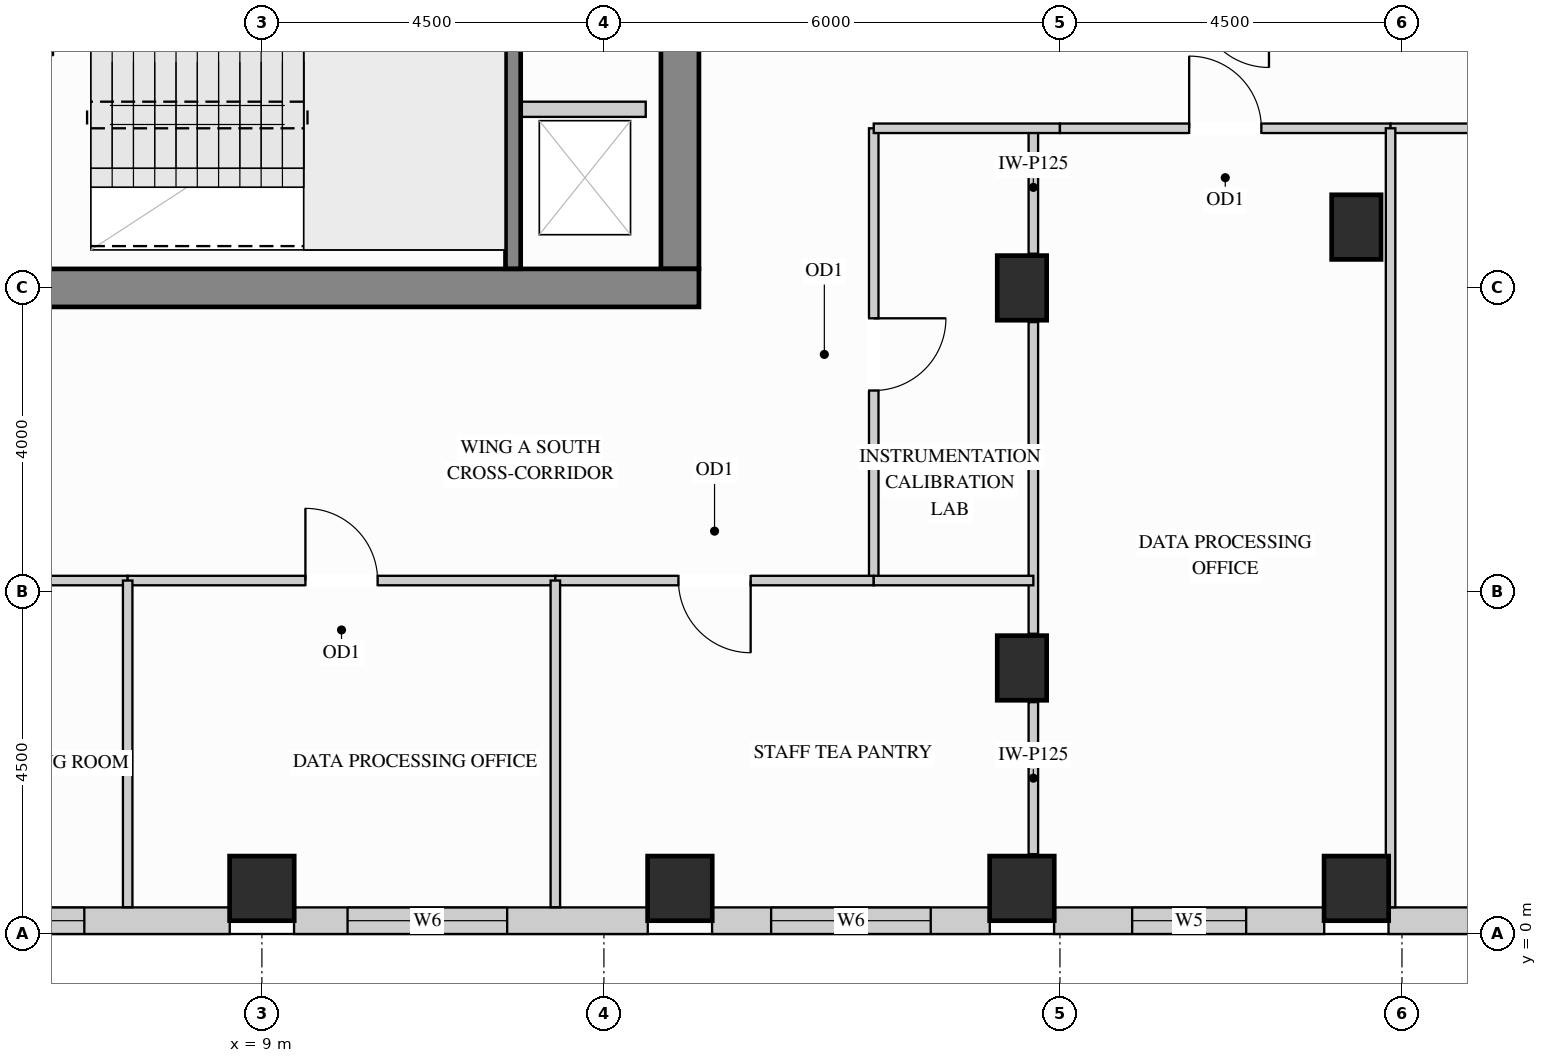
"""IFC4 building model, lengths in metres.
Left out: names, types, materials, properties, quantities, classifications, styles, units other than length and angle.
Written with IfcOpenShell. Run it as: python <this file> out.ifc"""

import sys

from ifc_helpers import new_model, si_unit, direction, frame, frame_2d, origin, origin_2d, place, context, subcontext, project, spatial, rectangle, extrude, source, transform, mapped, element, fill, save


model = new_model("IFC4")
c1 = context("Model", 3, precision=1e-05, world=origin(), true_north=direction((0.0, 1.0)))
c2 = subcontext(c1, "Body", "Model", "MODEL_VIEW")
j1 = project(units=[si_unit("LENGTHUNIT", "METRE"), si_unit("PLANEANGLEUNIT", "RADIAN")], contexts=[c1])
p1 = place(None, origin())
s1 = spatial("IfcSite", under=j1, at=p1, CompositionType="ELEMENT")
p2 = place(p1, origin())
s2 = spatial("IfcBuilding", under=s1, at=p2, CompositionType="ELEMENT")
p3 = place(p2, frame((0.0, 0.0, 252.0)))
s3 = spatial("IfcBuildingStorey", under=s2, at=p3, CompositionType="ELEMENT", Elevation=252.0)
m1 = source(origin(), c2, "Body", "SweptSolid", [
    extrude(rectangle(XDim=0.65, YDim=0.85, at=origin_2d()), origin(), (0.0, 0.0, 1.0), 3.4),
])
for number, where, z_axis, x_axis in (
    (1, (19.0, 3.5, 0.0), (0.0, 0.0, 1.0), (1.0, 0.0, 0.0)),
    (2, (19.0, 8.5, 0.0), (0.0, 0.0, 1.0), (1.0, 0.0, 0.0)),
    (3, (23.4, 9.3, 0.0), (0.0, 0.0, 1.0), (1.0, 0.0, 0.0)),
):
    element("IfcColumn", number, at=place(p3, frame(where, z_axis=z_axis, x_axis=x_axis)), inside=s3, PredefinedType="COLUMN", context=c2, shape_type="MappedRepresentation", body=[
        mapped(m1, transform((0.0, 0.0, 0.0), x_axis=(1.0, 0.0, 0.0), y_axis=(0.0, 1.0, 0.0), z_axis=(0.0, 0.0, 1.0))),
    ])
m2 = source(origin(), c2, "Body", "SweptSolid", [
    extrude(rectangle(XDim=0.85, YDim=0.85, at=origin_2d()), origin(), (0.0, 0.0, 1.0), 3.4),
])
for number, where, z_axis, x_axis in (
    (4, (14.5, 0.6, 0.0), (0.0, 0.0, 1.0), (1.0, 0.0, 0.0)),
    (5, (19.0, 0.6, 0.0), (0.0, 0.0, 1.0), (1.0, 0.0, 0.0)),
    (6, (23.4, 0.6, 0.0), (0.0, 0.0, 1.0), (1.0, 0.0, 0.0)),
    (7, (9.0, 0.6, 0.0), (0.0, 0.0, 1.0), (1.0, 0.0, 0.0)),
):
    element("IfcColumn", number, at=place(p3, frame(where, z_axis=z_axis, x_axis=x_axis)), inside=s3, PredefinedType="COLUMN", context=c2, shape_type="MappedRepresentation", body=[
        mapped(m2, transform((0.0, 0.0, 0.0), x_axis=(1.0, 0.0, 0.0), y_axis=(0.0, 1.0, 0.0), z_axis=(0.0, 0.0, 1.0))),
    ])
m3 = source(origin(), c2, "Body", "SweptSolid", [
    extrude(rectangle(XDim=10.07, YDim=0.5, at=frame_2d((5.035, 0.0))), origin(), (0.0, 0.0, 1.0), 3.4),
])
p4 = place(p3, frame((14.5, 8.75, 0.0), z_axis=(0.0, 0.0, 1.0), x_axis=(0.0, 1.0, 0.0)))
e8 = element("IfcWall", 8, at=p4, inside=s3, PredefinedType="SHEAR", context=c2, shape_type="MappedRepresentation", body=[
    mapped(m3, transform((0.0, 0.0, 0.0), x_axis=(1.0, 0.0, 0.0), y_axis=(0.0, 1.0, 0.0), z_axis=(0.0, 0.0, 1.0))),
])
m4 = source(origin(), c2, "Body", "SweptSolid", [
    extrude(rectangle(XDim=10.5, YDim=0.5, at=frame_2d((5.25, 0.0))), origin(), (0.0, 0.0, 1.0), 3.4),
])
p5 = place(p3, frame((4.25, 8.5, 0.0), z_axis=(0.0, 0.0, 1.0), x_axis=(1.0, 0.0, 0.0)))
e9 = element("IfcWall", 9, at=p5, inside=s3, PredefinedType="SHEAR", context=c2, shape_type="MappedRepresentation", body=[
    mapped(m4, transform((0.0, 0.0, 0.0), x_axis=(1.0, 0.0, 0.0), y_axis=(0.0, 1.0, 0.0), z_axis=(0.0, 0.0, 1.0))),
])
p6 = place(p3, frame((3.923, 0.175, 0.0), z_axis=(0.0, 0.0, 1.0), x_axis=(1.0, 0.0, 0.0)))
e10 = element("IfcWall", 10, at=p6, inside=s3, PredefinedType="SOLIDWALL", context=c2, shape_type="SweptSolid", body=[
    extrude(rectangle(XDim=4.654, YDim=0.35, at=frame_2d((2.327, 0.0))), origin(), (0.0, 0.0, 1.0), 3.385),
])
p7 = place(p6, frame((0.64, 0.0, 0.78)))
e11 = element("IfcOpeningElement", 11, at=p7, cuts=e10, PredefinedType="OPENING", context=c2, shape_type="SweptSolid", body=[
    extrude(rectangle(XDim=2.1, YDim=2.25, at=frame_2d((1.05, 1.125))), frame((0.0, 0.185, 0.0), z_axis=(0.0, -1.0, 0.0), x_axis=(1.0, 0.0, 0.0)), (0.0, 0.0, 1.0), 0.37),
])
p8 = place(p3, frame((9.423, 0.175, 0.0), z_axis=(0.0, 0.0, 1.0), x_axis=(1.0, 0.0, 0.0)))
e12 = element("IfcWall", 12, at=p8, inside=s3, PredefinedType="SOLIDWALL", context=c2, shape_type="SweptSolid", body=[
    extrude(rectangle(XDim=4.654, YDim=0.35, at=frame_2d((2.327, 0.0))), origin(), (0.0, 0.0, 1.0), 3.385),
])
p9 = place(p8, frame((0.704, 0.0, 0.78)))
e13 = element("IfcOpeningElement", 13, at=p9, cuts=e12, PredefinedType="OPENING", context=c2, shape_type="SweptSolid", body=[
    extrude(rectangle(XDim=2.1, YDim=2.25, at=frame_2d((1.05, 1.125))), frame((0.0, 0.185, 0.0), z_axis=(0.0, -1.0, 0.0), x_axis=(1.0, 0.0, 0.0)), (0.0, 0.0, 1.0), 0.37),
])
p10 = place(p3, frame((14.923, 0.175, 0.0), z_axis=(0.0, 0.0, 1.0), x_axis=(1.0, 0.0, 0.0)))
e14 = element("IfcWall", 14, at=p10, inside=s3, PredefinedType="SOLIDWALL", context=c2, shape_type="SweptSolid", body=[
    extrude(rectangle(XDim=3.654, YDim=0.35, at=frame_2d((1.827, 0.0))), origin(), (0.0, 0.0, 1.0), 3.385),
])
p11 = place(p10, frame((0.777, 0.0, 0.78)))
e15 = element("IfcOpeningElement", 15, at=p11, cuts=e14, PredefinedType="OPENING", context=c2, shape_type="SweptSolid", body=[
    extrude(rectangle(XDim=2.1, YDim=2.25, at=frame_2d((1.05, 1.125))), frame((0.0, 0.185, 0.0), z_axis=(0.0, -1.0, 0.0), x_axis=(1.0, 0.0, 0.0)), (0.0, 0.0, 1.0), 0.37),
])
p12 = place(p3, frame((19.423, 0.175, 0.0), z_axis=(0.0, 0.0, 1.0), x_axis=(1.0, 0.0, 0.0)))
e16 = element("IfcWall", 16, at=p12, inside=s3, PredefinedType="SOLIDWALL", context=c2, shape_type="SweptSolid", body=[
    extrude(rectangle(XDim=3.554, YDim=0.35, at=frame_2d((1.777, 0.0))), origin(), (0.0, 0.0, 1.0), 3.385),
])
p13 = place(p12, frame((1.027, 0.0, 0.78)))
e17 = element("IfcOpeningElement", 17, at=p13, cuts=e16, PredefinedType="OPENING", context=c2, shape_type="SweptSolid", body=[
    extrude(rectangle(XDim=1.5, YDim=2.0, at=frame_2d((0.75, 1.0))), frame((0.0, 0.185, 0.0), z_axis=(0.0, -1.0, 0.0), x_axis=(1.0, 0.0, 0.0)), (0.0, 0.0, 1.0), 0.37),
])
p14 = place(p3, frame((23.823, 0.175, 0.0), z_axis=(0.0, 0.0, 1.0), x_axis=(1.0, 0.0, 0.0)))
e18 = element("IfcWall", 18, at=p14, inside=s3, PredefinedType="SOLIDWALL", context=c2, shape_type="SweptSolid", body=[
    extrude(rectangle(XDim=6.254, YDim=0.35, at=frame_2d((3.127, 0.0))), origin(), (0.0, 0.0, 1.0), 3.385),
])
p15 = place(p14, frame((1.139, 0.0, 0.78)))
e19 = element("IfcOpeningElement", 19, at=p15, cuts=e18, PredefinedType="OPENING", context=c2, shape_type="SweptSolid", body=[
    extrude(rectangle(XDim=1.5, YDim=2.0, at=frame_2d((0.75, 1.0))), frame((0.0, 0.185, 0.0), z_axis=(0.0, -1.0, 0.0), x_axis=(1.0, 0.0, 0.0)), (0.0, 0.0, 1.0), 0.37),
])
p16 = place(p14, frame((3.458, 0.0, 0.78)))
e20 = element("IfcOpeningElement", 20, at=p16, cuts=e18, PredefinedType="OPENING", context=c2, shape_type="SweptSolid", body=[
    extrude(rectangle(XDim=1.5, YDim=2.0, at=frame_2d((0.75, 1.0))), frame((0.0, 0.185, 0.0), z_axis=(0.0, -1.0, 0.0), x_axis=(1.0, 0.0, 0.0)), (0.0, 0.0, 1.0), 0.37),
])
m5 = source(origin(), c2, "Body", "SweptSolid", [
    extrude(rectangle(XDim=2.0, YDim=0.125, at=frame_2d((1.0, 0.0))), origin(), (0.0, 0.0, 1.0), 2.773),
])
p17 = place(p3, frame((19.15, 1.05, 0.0), z_axis=(0.0, 0.0, 1.0), x_axis=(0.0, 1.0, 0.0)))
e21 = element("IfcWall", 21, at=p17, inside=s3, PredefinedType="PARTITIONING", context=c2, shape_type="MappedRepresentation", body=[
    mapped(m5, transform((0.0, 0.0, 0.0), x_axis=(1.0, 0.0, 0.0), y_axis=(0.0, 1.0, 0.0), z_axis=(0.0, 0.0, 1.0))),
])
m6 = source(origin(), c2, "Body", "SweptSolid", [
    extrude(rectangle(XDim=4.1, YDim=0.125, at=frame_2d((2.05, 0.0))), origin(), (0.0, 0.0, 1.0), 2.773),
])
p18 = place(p3, frame((19.15, 3.95, 0.0), z_axis=(0.0, 0.0, 1.0), x_axis=(0.0, 1.0, 0.0)))
e22 = element("IfcWall", 22, at=p18, inside=s3, PredefinedType="PARTITIONING", context=c2, shape_type="MappedRepresentation", body=[
    mapped(m6, transform((0.0, 0.0, 0.0), x_axis=(1.0, 0.0, 0.0), y_axis=(0.0, 1.0, 0.0), z_axis=(0.0, 0.0, 1.0))),
])
m7 = source(origin(), c2, "Body", "SweptSolid", [
    extrude(rectangle(XDim=1.65, YDim=0.125, at=frame_2d((0.825, 0.0))), origin(), (0.0, 0.0, 1.0), 2.773),
])
p19 = place(p3, frame((19.15, 8.95, 0.0), z_axis=(0.0, 0.0, 1.0), x_axis=(0.0, 1.0, 0.0)))
e23 = element("IfcWall", 23, at=p19, inside=s3, PredefinedType="PARTITIONING", context=c2, shape_type="MappedRepresentation", body=[
    mapped(m7, transform((0.0, 0.0, 0.0), x_axis=(1.0, 0.0, 0.0), y_axis=(0.0, 1.0, 0.0), z_axis=(0.0, 0.0, 1.0))),
])
p20 = place(p3, frame((17.05, 4.65, 0.0), z_axis=(0.0, 0.0, 1.0), x_axis=(0.0, 1.0, 0.0)))
e24 = element("IfcWall", 24, at=p20, inside=s3, PredefinedType="PARTITIONING", context=c2, shape_type="SweptSolid", body=[
    extrude(rectangle(XDim=5.95, YDim=0.125, at=frame_2d((2.975, 0.0))), origin(), (0.0, 0.0, 1.0), 3.385),
])
p21 = place(p20, frame((2.5, 0.0, 0.0)))
e25 = element("IfcOpeningElement", 25, at=p21, cuts=e24, PredefinedType="OPENING", context=c2, shape_type="SweptSolid", body=[
    extrude(rectangle(XDim=0.95, YDim=2.15, at=frame_2d((0.475, 1.075))), frame((0.0, 0.073, 0.0), z_axis=(0.0, -1.0, 0.0), x_axis=(1.0, 0.0, 0.0)), (0.0, 0.0, 1.0), 0.145),
])
m8 = source(origin(), c2, "Body", "SweptSolid", [
    extrude(rectangle(XDim=2.45, YDim=0.125, at=frame_2d((1.225, 0.0))), origin(), (0.0, 0.0, 1.0), 3.385),
])
p22 = place(p3, frame((17.05, 10.6, 0.0), z_axis=(0.0, 0.0, 1.0), x_axis=(1.0, 0.0, 0.0)))
e26 = element("IfcWall", 26, at=p22, inside=s3, PredefinedType="PARTITIONING", context=c2, shape_type="MappedRepresentation", body=[
    mapped(m8, transform((0.0, 0.0, 0.0), x_axis=(1.0, 0.0, 0.0), y_axis=(0.0, 1.0, 0.0), z_axis=(0.0, 0.0, 1.0))),
])
p23 = place(p3, frame((19.5, 10.6, 0.0), z_axis=(0.0, 0.0, 1.0), x_axis=(1.0, 0.0, 0.0)))
e27 = element("IfcWall", 27, at=p23, inside=s3, PredefinedType="PARTITIONING", context=c2, shape_type="SweptSolid", body=[
    extrude(rectangle(XDim=4.35, YDim=0.125, at=frame_2d((2.175, 0.0))), origin(), (0.0, 0.0, 1.0), 3.385),
])
p24 = place(p23, frame((1.7, 0.0, 0.0)))
e28 = element("IfcOpeningElement", 28, at=p24, cuts=e27, PredefinedType="OPENING", context=c2, shape_type="SweptSolid", body=[
    extrude(rectangle(XDim=0.95, YDim=2.15, at=frame_2d((0.475, 1.075))), frame((0.0, 0.073, 0.0), z_axis=(0.0, -1.0, 0.0), x_axis=(1.0, 0.0, 0.0)), (0.0, 0.0, 1.0), 0.145),
])
p25 = place(p3, frame((23.85, 10.6, 0.0), z_axis=(0.0, 0.0, 1.0), x_axis=(1.0, 0.0, 0.0)))
e29 = element("IfcWall", 29, at=p25, inside=s3, PredefinedType="PARTITIONING", context=c2, shape_type="SweptSolid", body=[
    extrude(rectangle(XDim=6.0, YDim=0.125, at=frame_2d((3.0, 0.0))), origin(), (0.0, 0.0, 1.0), 3.385),
])
p26 = place(p25, frame((2.525, 0.0, 0.0)))
e30 = element("IfcOpeningElement", 30, at=p26, cuts=e29, PredefinedType="OPENING", context=c2, shape_type="SweptSolid", body=[
    extrude(rectangle(XDim=0.95, YDim=2.15, at=frame_2d((0.475, 1.075))), frame((0.0, 0.073, 0.0), z_axis=(0.0, -1.0, 0.0), x_axis=(1.0, 0.0, 0.0)), (0.0, 0.0, 1.0), 0.145),
])
m9 = source(origin(), c2, "Body", "SweptSolid", [
    extrude(rectangle(XDim=10.248, YDim=0.125, at=frame_2d((5.124, 0.0))), origin(), (0.0, 0.0, 1.0), 3.385),
])
p27 = place(p3, frame((23.85, 0.352, 0.0), z_axis=(0.0, 0.0, 1.0), x_axis=(0.0, 1.0, 0.0)))
e31 = element("IfcWall", 31, at=p27, inside=s3, PredefinedType="PARTITIONING", context=c2, shape_type="MappedRepresentation", body=[
    mapped(m9, transform((0.0, 0.0, 0.0), x_axis=(1.0, 0.0, 0.0), y_axis=(0.0, 1.0, 0.0), z_axis=(0.0, 0.0, 1.0))),
])
p28 = place(p3, frame((2.45, 4.65, 0.0), z_axis=(0.0, 0.0, 1.0), x_axis=(1.0, 0.0, 0.0)))
e32 = element("IfcWall", 32, at=p28, inside=s3, PredefinedType="PARTITIONING", context=c2, shape_type="SweptSolid", body=[
    extrude(rectangle(XDim=4.784, YDim=0.125, at=frame_2d((2.392, 0.0))), origin(), (0.0, 0.0, 1.0), 2.848),
])
p29 = place(p28, frame((1.917, 0.0, 0.0)))
e33 = element("IfcOpeningElement", 33, at=p29, cuts=e32, PredefinedType="OPENING", context=c2, shape_type="SweptSolid", body=[
    extrude(rectangle(XDim=0.95, YDim=2.15, at=frame_2d((0.475, 1.075))), frame((0.0, 0.073, 0.0), z_axis=(0.0, -1.0, 0.0), x_axis=(1.0, 0.0, 0.0)), (0.0, 0.0, 1.0), 0.145),
])
p30 = place(p3, frame((7.234, 4.65, 0.0), z_axis=(0.0, 0.0, 1.0), x_axis=(1.0, 0.0, 0.0)))
e34 = element("IfcWall", 34, at=p30, inside=s3, PredefinedType="PARTITIONING", context=c2, shape_type="SweptSolid", body=[
    extrude(rectangle(XDim=5.627, YDim=0.125, at=frame_2d((2.813, 0.0))), origin(), (0.0, 0.0, 1.0), 2.848),
])
p31 = place(p30, frame((2.338, 0.0, 0.0)))
e35 = element("IfcOpeningElement", 35, at=p31, cuts=e34, PredefinedType="OPENING", context=c2, shape_type="SweptSolid", body=[
    extrude(rectangle(XDim=0.95, YDim=2.15, at=frame_2d((0.475, 1.075))), frame((0.0, 0.073, 0.0), z_axis=(0.0, -1.0, 0.0), x_axis=(1.0, 0.0, 0.0)), (0.0, 0.0, 1.0), 0.145),
])
p32 = place(p3, frame((12.861, 4.65, 0.0), z_axis=(0.0, 0.0, 1.0), x_axis=(1.0, 0.0, 0.0)))
e36 = element("IfcWall", 36, at=p32, inside=s3, PredefinedType="PARTITIONING", context=c2, shape_type="SweptSolid", body=[
    extrude(rectangle(XDim=4.189, YDim=0.125, at=frame_2d((2.094, 0.0))), origin(), (0.0, 0.0, 1.0), 2.848),
])
p33 = place(p32, frame((1.619, 0.0, 0.0)))
e37 = element("IfcOpeningElement", 37, at=p33, cuts=e36, PredefinedType="OPENING", context=c2, shape_type="SweptSolid", body=[
    extrude(rectangle(XDim=0.95, YDim=2.15, at=frame_2d((0.475, 1.075))), frame((0.0, 0.073, 0.0), z_axis=(0.0, -1.0, 0.0), x_axis=(1.0, 0.0, 0.0)), (0.0, 0.0, 1.0), 0.145),
])
m10 = source(origin(), c2, "Body", "SweptSolid", [
    extrude(rectangle(XDim=2.1, YDim=0.125, at=frame_2d((1.05, 0.0))), origin(), (0.0, 0.0, 1.0), 2.848),
])
p34 = place(p3, frame((17.05, 4.65, 0.0), z_axis=(0.0, 0.0, 1.0), x_axis=(1.0, 0.0, 0.0)))
e38 = element("IfcWall", 38, at=p34, inside=s3, PredefinedType="PARTITIONING", context=c2, shape_type="MappedRepresentation", body=[
    mapped(m10, transform((0.0, 0.0, 0.0), x_axis=(1.0, 0.0, 0.0), y_axis=(0.0, 1.0, 0.0), z_axis=(0.0, 0.0, 1.0))),
])
m11 = source(origin(), c2, "Body", "SweptSolid", [
    extrude(rectangle(XDim=4.298, YDim=0.125, at=frame_2d((2.149, 0.0))), origin(), (0.0, 0.0, 1.0), 3.385),
])
for number, where, z_axis, x_axis in (
    (39, (7.234, 0.352, 0.0), (0.0, 0.0, 1.0), (0.0, 1.0, 0.0)),
    (40, (12.861, 0.352, 0.0), (0.0, 0.0, 1.0), (0.0, 1.0, 0.0)),
):
    element("IfcWall", number, at=place(p3, frame(where, z_axis=z_axis, x_axis=x_axis)), inside=s3, PredefinedType="PARTITIONING", context=c2, shape_type="MappedRepresentation", body=[
        mapped(m11, transform((0.0, 0.0, 0.0), x_axis=(1.0, 0.0, 0.0), y_axis=(0.0, 1.0, 0.0), z_axis=(0.0, 0.0, 1.0))),
    ])
m12 = source(origin(), c2, "Body", "SweptSolid", [
    extrude(rectangle(XDim=1.63, YDim=0.2, at=frame_2d((0.815, 0.0))), origin(), (0.0, 0.0, 1.0), 3.385),
])
p35 = place(p3, frame((12.42, 10.85, 0.0), z_axis=(0.0, 0.0, 1.0), x_axis=(1.0, 0.0, 0.0)))
e41 = element("IfcWall", 41, at=p35, inside=s3, PredefinedType="PARTITIONING", context=c2, shape_type="MappedRepresentation", body=[
    mapped(m12, transform((0.0, 0.0, 0.0), x_axis=(1.0, 0.0, 0.0), y_axis=(0.0, 1.0, 0.0), z_axis=(0.0, 0.0, 1.0))),
])
m13 = source(origin(), c2, "Body", "SweptSolid", [
    extrude(rectangle(XDim=3.803, YDim=0.2, at=frame_2d((1.901, 0.0))), origin(), (0.0, 0.0, 1.0), 3.4),
])
p36 = place(p3, frame((12.305, 8.752, 0.0), z_axis=(0.0, 0.0, 1.0), x_axis=(0.0, 1.0, 0.0)))
e42 = element("IfcWall", 42, at=p36, inside=s3, PredefinedType="SHEAR", context=c2, shape_type="MappedRepresentation", body=[
    mapped(m13, transform((0.0, 0.0, 0.0), x_axis=(1.0, 0.0, 0.0), y_axis=(0.0, 1.0, 0.0), z_axis=(0.0, 0.0, 1.0))),
])
m14 = source(origin(), c2, "Body", "SweptSolid", [
    extrude(rectangle(XDim=0.95, YDim=2.15, at=frame_2d((0.475, 1.075))), frame((0.0, 0.025, 0.0), z_axis=(0.0, -1.0, 0.0), x_axis=(1.0, 0.0, 0.0)), (0.0, 0.0, 1.0), 0.05),
])
p37 = place(p21, origin())
e43 = element("IfcDoor", 43, at=p37, inside=s3, OperationType="SINGLE_SWING_RIGHT", PredefinedType="DOOR", context=c2, shape_type="MappedRepresentation", body=[
    mapped(m14, transform((0.0, 0.0, 0.0), x_axis=(1.0, 0.0, 0.0), y_axis=(0.0, 1.0, 0.0), z_axis=(0.0, 0.0, 1.0))),
])
fill(e25, e43)
p38 = place(p31, origin())
e44 = element("IfcDoor", 44, at=p38, inside=s3, OperationType="SINGLE_SWING_LEFT", PredefinedType="DOOR", context=c2, shape_type="MappedRepresentation", body=[
    mapped(m14, transform((0.0, 0.0, 0.0), x_axis=(1.0, 0.0, 0.0), y_axis=(0.0, 1.0, 0.0), z_axis=(0.0, 0.0, 1.0))),
])
fill(e35, e44)
p39 = place(p33, origin())
e45 = element("IfcDoor", 45, at=p39, inside=s3, OperationType="SINGLE_SWING_RIGHT", PredefinedType="DOOR", context=c2, shape_type="MappedRepresentation", body=[
    mapped(m14, transform((0.0, 0.0, 0.0), x_axis=(1.0, 0.0, 0.0), y_axis=(0.0, 1.0, 0.0), z_axis=(0.0, 0.0, 1.0))),
])
fill(e37, e45)
p40 = place(p24, origin())
e46 = element("IfcDoor", 46, at=p40, inside=s3, OperationType="SINGLE_SWING_LEFT", PredefinedType="DOOR", context=c2, shape_type="MappedRepresentation", body=[
    mapped(m14, transform((0.0, 0.0, 0.0), x_axis=(1.0, 0.0, 0.0), y_axis=(0.0, 1.0, 0.0), z_axis=(0.0, 0.0, 1.0))),
])
fill(e28, e46)
m15 = source(origin(), c2, "Body", "SweptSolid", [
    extrude(rectangle(XDim=1.5, YDim=2.0, at=frame_2d((0.75, 1.0))), frame((0.0, 0.03, 0.0), z_axis=(0.0, -1.0, 0.0), x_axis=(1.0, 0.0, 0.0)), (0.0, 0.0, 1.0), 0.06),
])
p41 = place(p13, origin())
e47 = element("IfcWindow", 47, at=p41, inside=s3, PartitioningType="SINGLE_PANEL", PredefinedType="WINDOW", context=c2, shape_type="MappedRepresentation", body=[
    mapped(m15, transform((0.0, 0.0, 0.0), x_axis=(1.0, 0.0, 0.0), y_axis=(0.0, 1.0, 0.0), z_axis=(0.0, 0.0, 1.0))),
])
fill(e17, e47)
m16 = source(origin(), c2, "Body", "SweptSolid", [
    extrude(rectangle(XDim=2.1, YDim=2.25, at=frame_2d((1.05, 1.125))), frame((0.0, 0.03, 0.0), z_axis=(0.0, -1.0, 0.0), x_axis=(1.0, 0.0, 0.0)), (0.0, 0.0, 1.0), 0.06),
])
p42 = place(p7, origin())
e48 = element("IfcWindow", 48, at=p42, inside=s3, PartitioningType="SINGLE_PANEL", PredefinedType="WINDOW", context=c2, shape_type="MappedRepresentation", body=[
    mapped(m16, transform((0.0, 0.0, 0.0), x_axis=(1.0, 0.0, 0.0), y_axis=(0.0, 1.0, 0.0), z_axis=(0.0, 0.0, 1.0))),
])
fill(e11, e48)
p43 = place(p9, origin())
e49 = element("IfcWindow", 49, at=p43, inside=s3, PartitioningType="SINGLE_PANEL", PredefinedType="WINDOW", context=c2, shape_type="MappedRepresentation", body=[
    mapped(m16, transform((0.0, 0.0, 0.0), x_axis=(1.0, 0.0, 0.0), y_axis=(0.0, 1.0, 0.0), z_axis=(0.0, 0.0, 1.0))),
])
fill(e13, e49)
p44 = place(p11, origin())
e50 = element("IfcWindow", 50, at=p44, inside=s3, PartitioningType="SINGLE_PANEL", PredefinedType="WINDOW", context=c2, shape_type="MappedRepresentation", body=[
    mapped(m16, transform((0.0, 0.0, 0.0), x_axis=(1.0, 0.0, 0.0), y_axis=(0.0, 1.0, 0.0), z_axis=(0.0, 0.0, 1.0))),
])
fill(e15, e50)
save(model, sys.argv[1])
